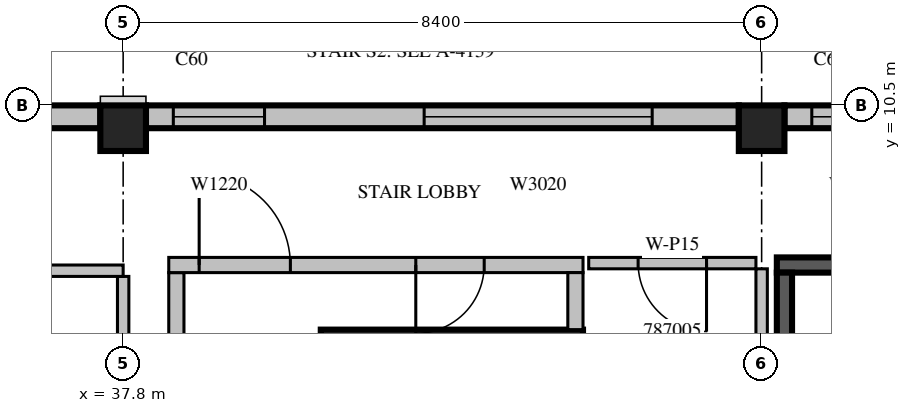
"""IFC4 building model, lengths in metres.
Left out: names, types, materials, properties, quantities, classifications, styles, units other than length and angle.
Written with IfcOpenShell. Run it as: python <this file> out.ifc"""

import sys

from ifc_helpers import new_model, si_unit, direction, frame, frame_2d, origin, origin_2d, place, context, subcontext, project, spatial, rectangle, extrude, source, transform, mapped, element, fill, save


model = new_model("IFC4")
c1 = context("Model", 3, precision=1e-05, world=origin(), true_north=direction((0.0, 1.0)))
c2 = subcontext(c1, "Body", "Model", "MODEL_VIEW")
j1 = project(units=[si_unit("LENGTHUNIT", "METRE"), si_unit("PLANEANGLEUNIT", "RADIAN")], contexts=[c1])
p1 = place(None, origin())
s1 = spatial("IfcSite", under=j1, at=p1, CompositionType="ELEMENT")
p2 = place(p1, origin())
s2 = spatial("IfcBuilding", under=s1, at=p2, CompositionType="ELEMENT")
p3 = place(p2, frame((0.0, 0.0, 365.0)))
s3 = spatial("IfcBuildingStorey", under=s2, at=p3, CompositionType="ELEMENT", Elevation=365.0)
m1 = source(origin(), c2, "Body", "SweptSolid", [
    extrude(rectangle(XDim=0.6, YDim=0.6, at=origin_2d()), origin(), (0.0, 0.0, 1.0), 3.5),
])
for number, where, z_axis, x_axis in (
    (1, (37.8, 10.2, 0.0), (0.0, 0.0, 1.0), (1.0, 0.0, 0.0)),
    (2, (46.2, 10.2, 0.0), (0.0, 0.0, 1.0), (1.0, 0.0, 0.0)),
):
    element("IfcColumn", number, at=place(p3, frame(where, z_axis=z_axis, x_axis=x_axis)), inside=s3, PredefinedType="COLUMN", context=c2, shape_type="MappedRepresentation", body=[
        mapped(m1, transform((0.0, 0.0, 0.0), scale=1.0)),
    ])
m2 = source(origin(), c2, "Body", "SweptSolid", [
    extrude(rectangle(XDim=3.06, YDim=0.3, at=frame_2d((1.53, 0.0))), origin(), (0.0, 0.0, 1.0), 3.05),
])
p4 = place(p3, frame((49.56, 10.35, 0.0), z_axis=(0.0, 0.0, 1.0), x_axis=(-1.0, 0.0, 0.0)))
e3 = element("IfcWall", 3, at=p4, inside=s3, PredefinedType="STANDARD", context=c2, shape_type="MappedRepresentation", body=[
    mapped(m2, transform((0.0, 0.0, 0.0), scale=1.0)),
])
m3 = source(origin(), c2, "Body", "SweptSolid", [
    extrude(rectangle(XDim=1.2, YDim=2.0, at=frame_2d((0.6, 1.0))), frame((0.0, 0.16, 0.0), z_axis=(0.0, -1.0, 0.0), x_axis=(1.0, 0.0, 0.0)), (0.0, 0.0, 1.0), 0.32),
])
p5 = place(p4, frame((1.5, 0.0, 0.6)))
e4 = element("IfcOpeningElement", 4, at=p5, cuts=e3, PredefinedType="OPENING", context=c2, shape_type="MappedRepresentation", body=[
    mapped(m3, transform((0.0, 0.0, 0.0), scale=1.0)),
])
m4 = source(origin(), c2, "Body", "SweptSolid", [
    extrude(rectangle(XDim=7.8, YDim=0.3, at=frame_2d((3.9, 0.0))), origin(), (0.0, 0.0, 1.0), 3.05),
])
p6 = place(p3, frame((45.9, 10.35, 0.0), z_axis=(0.0, 0.0, 1.0), x_axis=(-1.0, 0.0, 0.0)))
e5 = element("IfcWall", 5, at=p6, inside=s3, PredefinedType="STANDARD", context=c2, shape_type="MappedRepresentation", body=[
    mapped(m4, transform((0.0, 0.0, 0.0), scale=1.0)),
])
m5 = source(origin(), c2, "Body", "SweptSolid", [
    extrude(rectangle(XDim=3.0, YDim=2.0, at=frame_2d((1.5, 1.0))), frame((0.0, 0.16, 0.0), z_axis=(0.0, -1.0, 0.0), x_axis=(1.0, 0.0, 0.0)), (0.0, 0.0, 1.0), 0.32),
])
p7 = place(p6, frame((1.14, 0.0, 0.6)))
e6 = element("IfcOpeningElement", 6, at=p7, cuts=e5, PredefinedType="OPENING", context=c2, shape_type="MappedRepresentation", body=[
    mapped(m5, transform((0.0, 0.0, 0.0), scale=1.0)),
])
p8 = place(p6, frame((6.24, 0.0, 0.6)))
e7 = element("IfcOpeningElement", 7, at=p8, cuts=e5, PredefinedType="OPENING", context=c2, shape_type="MappedRepresentation", body=[
    mapped(m3, transform((0.0, 0.0, 0.0), scale=1.0)),
])
p9 = place(p3, frame((37.5, 10.35, 0.0), z_axis=(0.0, 0.0, 1.0), x_axis=(-1.0, 0.0, 0.0)))
e8 = element("IfcWall", 8, at=p9, inside=s3, PredefinedType="STANDARD", context=c2, shape_type="MappedRepresentation", body=[
    mapped(m4, transform((0.0, 0.0, 0.0), scale=1.0)),
])
p10 = place(p9, frame((1.14, 0.0, 0.6)))
e9 = element("IfcOpeningElement", 9, at=p10, cuts=e8, PredefinedType="OPENING", context=c2, shape_type="MappedRepresentation", body=[
    mapped(m5, transform((0.0, 0.0, 0.0), scale=1.0)),
])
p11 = place(p9, frame((6.24, 0.0, 0.6)))
e10 = element("IfcOpeningElement", 10, at=p11, cuts=e8, PredefinedType="OPENING", context=c2, shape_type="MappedRepresentation", body=[
    mapped(m3, transform((0.0, 0.0, 0.0), scale=1.0)),
])
m6 = source(origin(), c2, "Body", "SweptSolid", [
    extrude(rectangle(XDim=2.8, YDim=0.2, at=frame_2d((1.4, 0.0))), origin(), (0.0, 0.0, 1.0), 3.5),
])
p12 = place(p3, frame((46.4, 8.4, 0.0), z_axis=(0.0, 0.0, 1.0), x_axis=(1.0, 0.0, 0.0)))
e11 = element("IfcWall", 11, at=p12, inside=s3, PredefinedType="SOLIDWALL", context=c2, shape_type="MappedRepresentation", body=[
    mapped(m6, transform((0.0, 0.0, 0.0), scale=1.0)),
])
m7 = source(origin(), c2, "Body", "SweptSolid", [
    extrude(rectangle(XDim=3.1, YDim=0.2, at=frame_2d((1.55, 0.0))), origin(), (0.0, 0.0, 1.0), 3.5),
])
p13 = place(p3, frame((46.5, 5.2, 0.0), z_axis=(0.0, 0.0, 1.0), x_axis=(0.0, 1.0, 0.0)))
e12 = element("IfcWall", 12, at=p13, inside=s3, PredefinedType="SOLIDWALL", context=c2, shape_type="MappedRepresentation", body=[
    mapped(m7, transform((0.0, 0.0, 0.0), scale=1.0)),
])
p14 = place(p3, frame((40.4, 7.425, 0.0), z_axis=(0.0, 0.0, 1.0), x_axis=(1.0, 0.0, 0.0)))
e13 = element("IfcWall", 13, at=p14, inside=s3, PredefinedType="SOLIDWALL", context=c2, shape_type="SweptSolid", body=[
    extrude(rectangle(XDim=3.45, YDim=0.25, at=frame_2d((1.725, 0.0))), origin(), (0.0, 0.0, 1.0), 3.05),
])
p15 = place(p3, frame((38.5, 0.3, 0.0), z_axis=(0.0, 0.0, 1.0), x_axis=(0.0, 1.0, 0.0)))
e14 = element("IfcWall", 14, at=p15, inside=s3, PredefinedType="PARTITIONING", context=c2, shape_type="SweptSolid", body=[
    extrude(rectangle(XDim=8.0, YDim=0.2, at=frame_2d((4.0, 0.0))), origin(), (0.0, 0.0, 1.0), 3.05),
])
p16 = place(p3, frame((38.4, 8.4, 0.0), z_axis=(0.0, 0.0, 1.0), x_axis=(1.0, 0.0, 0.0)))
e15 = element("IfcWall", 15, at=p16, inside=s3, PredefinedType="PARTITIONING", context=c2, shape_type="SweptSolid", body=[
    extrude(rectangle(XDim=5.45, YDim=0.2, at=frame_2d((2.725, 0.0))), origin(), (0.0, 0.0, 1.0), 3.05),
])
m8 = source(origin(), c2, "Body", "SweptSolid", [
    extrude(rectangle(XDim=1.2, YDim=2.1, at=frame_2d((0.6, 1.05))), frame((0.0, 0.11, 0.0), z_axis=(0.0, -1.0, 0.0), x_axis=(1.0, 0.0, 0.0)), (0.0, 0.0, 1.0), 0.22),
])
p17 = place(p16, frame((0.4, 0.0, 0.0)))
e16 = element("IfcOpeningElement", 16, at=p17, cuts=e15, PredefinedType="OPENING", context=c2, shape_type="MappedRepresentation", body=[
    mapped(m8, transform((0.0, 0.0, 0.0), scale=1.0)),
])
m9 = source(origin(), c2, "Body", "SweptSolid", [
    extrude(rectangle(XDim=0.9, YDim=2.1, at=frame_2d((0.45, 1.05))), frame((0.0, 0.11, 0.0), z_axis=(0.0, -1.0, 0.0), x_axis=(1.0, 0.0, 0.0)), (0.0, 0.0, 1.0), 0.22),
])
p18 = place(p16, frame((3.25, 0.0, 0.0)))
e17 = element("IfcOpeningElement", 17, at=p18, cuts=e15, PredefinedType="OPENING", context=c2, shape_type="MappedRepresentation", body=[
    mapped(m9, transform((0.0, 0.0, 0.0), scale=1.0)),
])
p19 = place(p3, frame((43.75, 7.55, 0.0), z_axis=(0.0, 0.0, 1.0), x_axis=(0.0, 1.0, 0.0)))
e18 = element("IfcWall", 18, at=p19, inside=s3, PredefinedType="PARTITIONING", context=c2, shape_type="SweptSolid", body=[
    extrude(rectangle(XDim=0.75, YDim=0.2, at=frame_2d((0.375, 0.0))), origin(), (0.0, 0.0, 1.0), 3.05),
])
p20 = place(p3, frame((46.125, 8.425, 0.0), z_axis=(0.0, 0.0, 1.0), x_axis=(-1.0, 0.0, 0.0)))
e19 = element("IfcWall", 19, at=p20, inside=s3, PredefinedType="PARTITIONING", context=c2, shape_type="SweptSolid", body=[
    extrude(rectangle(XDim=2.2, YDim=0.15, at=frame_2d((1.1, 0.0))), origin(), (0.0, 0.0, 1.0), 3.05),
])
m10 = source(origin(), c2, "Body", "SweptSolid", [
    extrude(rectangle(XDim=0.9, YDim=2.1, at=frame_2d((0.45, 1.05))), frame((0.0, 0.085, 0.0), z_axis=(0.0, -1.0, 0.0), x_axis=(1.0, 0.0, 0.0)), (0.0, 0.0, 1.0), 0.17),
])
p21 = place(p20, frame((0.65, 0.0, 0.0)))
e20 = element("IfcOpeningElement", 20, at=p21, cuts=e19, PredefinedType="OPENING", context=c2, shape_type="MappedRepresentation", body=[
    mapped(m10, transform((0.0, 0.0, 0.0), scale=1.0)),
])
m11 = source(origin(), c2, "Body", "SweptSolid", [
    extrude(rectangle(XDim=3.2, YDim=0.15, at=frame_2d((1.6, 0.0))), origin(), (0.0, 0.0, 1.0), 3.05),
])
p22 = place(p3, frame((37.8, 5.05, 0.0), z_axis=(0.0, 0.0, 1.0), x_axis=(0.0, 1.0, 0.0)))
e21 = element("IfcWall", 21, at=p22, inside=s3, PredefinedType="PARTITIONING", context=c2, shape_type="MappedRepresentation", body=[
    mapped(m11, transform((0.0, 0.0, 0.0), scale=1.0)),
])
p23 = place(p3, frame((46.2, 8.35, 0.0), z_axis=(0.0, 0.0, 1.0), x_axis=(0.0, -1.0, 0.0)))
e22 = element("IfcWall", 22, at=p23, inside=s3, PredefinedType="PARTITIONING", context=c2, shape_type="SweptSolid", body=[
    extrude(rectangle(XDim=7.751, YDim=0.15, at=frame_2d((3.876, 0.0))), origin(), (0.0, 0.0, 1.0), 3.05),
])
p24 = place(p23, frame((5.4, 0.0, 0.0)))
e23 = element("IfcOpeningElement", 23, at=p24, cuts=e22, PredefinedType="OPENING", context=c2, shape_type="MappedRepresentation", body=[
    mapped(m10, transform((0.0, 0.0, 0.0), scale=1.0)),
])
m12 = source(origin(), c2, "Body", "SweptSolid", [
    extrude(rectangle(XDim=8.4, YDim=0.15, at=frame_2d((4.2, 0.0))), origin(), (0.0, 0.0, 1.0), 3.05),
])
p25 = place(p3, frame((37.8, 8.325, 0.0), z_axis=(0.0, 0.0, 1.0), x_axis=(-1.0, 0.0, 0.0)))
e24 = element("IfcWall", 24, at=p25, inside=s3, PredefinedType="PARTITIONING", context=c2, shape_type="MappedRepresentation", body=[
    mapped(m12, transform((0.0, 0.0, 0.0), scale=1.0)),
])
m13 = source(origin(), c2, "Body", "SweptSolid", [
    extrude(rectangle(XDim=1.0, YDim=2.1, at=frame_2d((0.5, 1.05))), frame((0.0, 0.085, 0.0), z_axis=(0.0, -1.0, 0.0), x_axis=(1.0, 0.0, 0.0)), (0.0, 0.0, 1.0), 0.17),
])
p26 = place(p25, frame((3.658, 0.0, 0.0)))
e25 = element("IfcOpeningElement", 25, at=p26, cuts=e24, PredefinedType="OPENING", context=c2, shape_type="MappedRepresentation", body=[
    mapped(m13, transform((0.0, 0.0, 0.0), scale=1.0)),
])
m14 = source(origin(), c2, "Body", "SweptSolid", [
    extrude(rectangle(XDim=1.2, YDim=2.0, at=frame_2d((0.6, 1.0))), frame((0.0, 0.03, 0.0), z_axis=(0.0, -1.0, 0.0), x_axis=(1.0, 0.0, 0.0)), (0.0, 0.0, 1.0), 0.06),
])
p27 = place(p5, origin())
e26 = element("IfcWindow", 26, at=p27, inside=s3, PartitioningType="SINGLE_PANEL", PredefinedType="WINDOW", context=c2, shape_type="MappedRepresentation", body=[
    mapped(m14, transform((0.0, 0.0, 0.0), scale=1.0)),
])
fill(e4, e26)
m15 = source(origin(), c2, "Body", "SweptSolid", [
    extrude(rectangle(XDim=3.0, YDim=2.0, at=frame_2d((1.5, 1.0))), frame((0.0, 0.03, 0.0), z_axis=(0.0, -1.0, 0.0), x_axis=(1.0, 0.0, 0.0)), (0.0, 0.0, 1.0), 0.06),
])
p28 = place(p7, origin())
e27 = element("IfcWindow", 27, at=p28, inside=s3, PartitioningType="SINGLE_PANEL", PredefinedType="WINDOW", context=c2, shape_type="MappedRepresentation", body=[
    mapped(m15, transform((0.0, 0.0, 0.0), scale=1.0)),
])
fill(e6, e27)
p29 = place(p8, origin())
e28 = element("IfcWindow", 28, at=p29, inside=s3, PartitioningType="SINGLE_PANEL", PredefinedType="WINDOW", context=c2, shape_type="MappedRepresentation", body=[
    mapped(m14, transform((0.0, 0.0, 0.0), scale=1.0)),
])
fill(e7, e28)
m16 = source(origin(), c2, "Body", "SweptSolid", [
    extrude(rectangle(XDim=1.2, YDim=2.1, at=frame_2d((0.6, 1.05))), frame((0.0, 0.025, 0.0), z_axis=(0.0, -1.0, 0.0), x_axis=(1.0, 0.0, 0.0)), (0.0, 0.0, 1.0), 0.05),
])
p30 = place(p17, origin())
e29 = element("IfcDoor", 29, at=p30, inside=s3, OperationType="SINGLE_SWING_LEFT", PredefinedType="DOOR", context=c2, shape_type="MappedRepresentation", body=[
    mapped(m16, transform((0.0, 0.0, 0.0), scale=1.0)),
])
fill(e16, e29)
m17 = source(origin(), c2, "Body", "SweptSolid", [
    extrude(rectangle(XDim=0.9, YDim=2.1, at=frame_2d((0.45, 1.05))), frame((0.0, 0.025, 0.0), z_axis=(0.0, -1.0, 0.0), x_axis=(1.0, 0.0, 0.0)), (0.0, 0.0, 1.0), 0.05),
])
p31 = place(p18, origin())
e30 = element("IfcDoor", 30, at=p31, inside=s3, OperationType="SINGLE_SWING_RIGHT", PredefinedType="DOOR", context=c2, shape_type="MappedRepresentation", body=[
    mapped(m17, transform((0.0, 0.0, 0.0), scale=1.0)),
])
fill(e17, e30)
p32 = place(p21, origin())
e31 = element("IfcDoor", 31, at=p32, inside=s3, OperationType="SINGLE_SWING_LEFT", PredefinedType="DOOR", context=c2, shape_type="MappedRepresentation", body=[
    mapped(m17, transform((0.0, 0.0, 0.0), scale=1.0)),
])
fill(e20, e31)
save(model, sys.argv[1])
